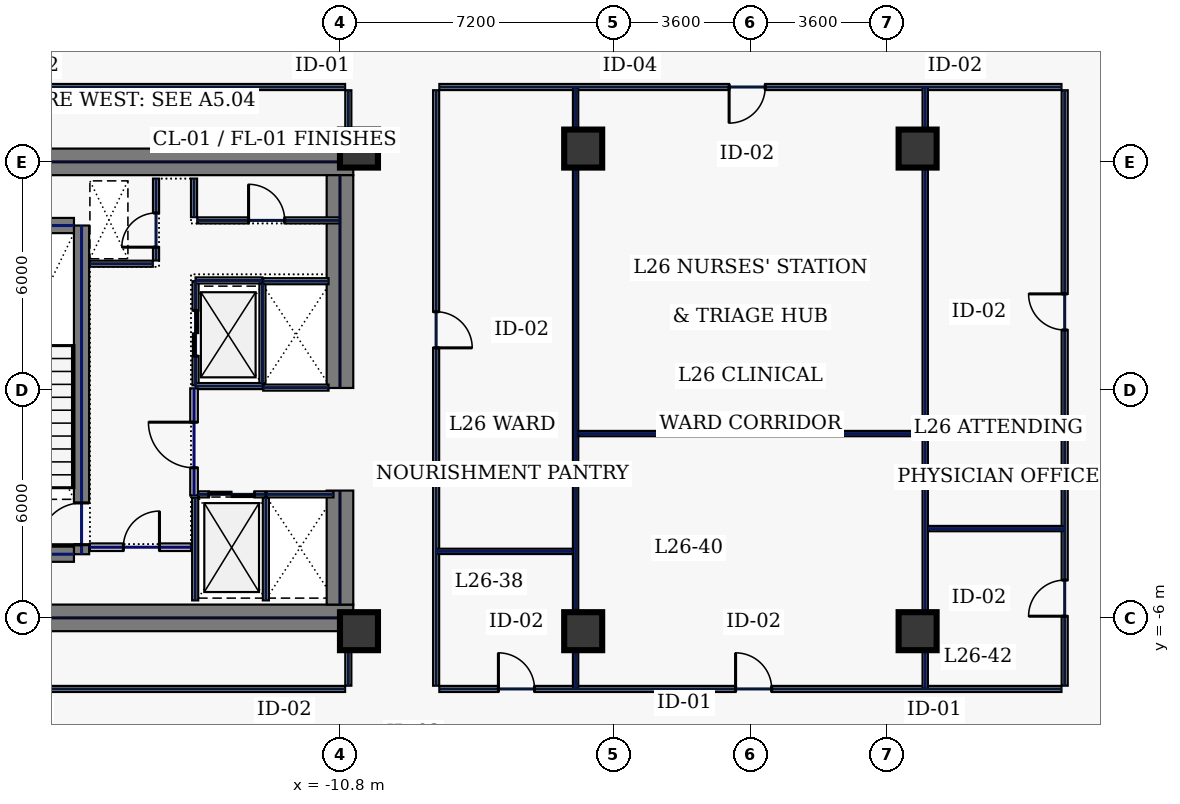
"""IFC4 building model, lengths in metres.
Left out: names, types, materials, properties, quantities, classifications, styles, units other than length and angle.
Written with IfcOpenShell. Run it as: python <this file> out.ifc"""

import sys

from ifc_helpers import new_model, si_unit, direction, frame, frame_2d, origin, origin_2d, place, context, subcontext, project, spatial, rectangle, hollow_rectangle, extrude, element, fill, save


model = new_model("IFC4")
c1 = context("Model", 3, precision=1e-05, world=origin(), true_north=direction((0.0, 1.0)))
c2 = subcontext(c1, "Body", "Model", "MODEL_VIEW")
j1 = project(units=[si_unit("LENGTHUNIT", "METRE"), si_unit("PLANEANGLEUNIT", "RADIAN")], contexts=[c1])
p1 = place(None, origin())
s1 = spatial("IfcSite", under=j1, at=p1, CompositionType="ELEMENT")
p2 = place(p1, origin())
s2 = spatial("IfcBuilding", under=s1, at=p2, CompositionType="ELEMENT")
p3 = place(p2, frame((0.0, 0.0, 117.4)))
s3 = spatial("IfcBuildingStorey", under=s2, at=p3, CompositionType="ELEMENT", Elevation=117.4)
for number, where, z_axis, x_axis in (
    (1, (-22.0, 6.0, 0.0), (0.0, 0.0, 1.0), (1.0, 0.0, 0.0)),
    (2, (-22.0, -6.0, 0.0), (0.0, 0.0, 1.0), (1.0, 0.0, 0.0)),
):
    element("IfcWall", number, at=place(p3, frame(where, z_axis=z_axis, x_axis=x_axis)), inside=s3, PredefinedType="SHEAR", context=c2, shape_type="SweptSolid", body=[
        extrude(rectangle(XDim=11.55, YDim=0.7, at=frame_2d((5.775, 0.0))), origin(), (0.0, 0.0, 1.0), 3.74),
    ])
p4 = place(p3, frame((-10.8, -5.65, 0.0), z_axis=(0.0, 0.0, 1.0), x_axis=(0.0, 1.0, 0.0)))
e3 = element("IfcWall", 3, at=p4, inside=s3, PredefinedType="SHEAR", context=c2, shape_type="SweptSolid", body=[
    extrude(rectangle(XDim=3.0, YDim=0.7, at=frame_2d((1.5, 0.0))), origin(), (0.0, 0.0, 1.0), 3.74),
])
p5 = place(p3, frame((-10.8, 0.05, 0.0), z_axis=(0.0, 0.0, 1.0), x_axis=(0.0, 1.0, 0.0)))
e4 = element("IfcWall", 4, at=p5, inside=s3, PredefinedType="SHEAR", context=c2, shape_type="SweptSolid", body=[
    extrude(rectangle(XDim=5.6, YDim=0.7, at=frame_2d((2.8, 0.0))), origin(), (0.0, 0.0, 1.0), 3.74),
])
p6 = place(p3, frame((-17.6, -4.325, 0.0), z_axis=(0.0, 0.0, 1.0), x_axis=(0.0, 1.0, 0.0)))
e5 = element("IfcWall", 5, at=p6, inside=s3, PredefinedType="SHEAR", context=c2, shape_type="SweptSolid", body=[
    extrude(rectangle(XDim=8.65, YDim=0.4, at=frame_2d((4.325, 0.0))), origin(), (0.0, 0.0, 1.0), 3.74),
])
p7 = place(p6, frame((0.25, 0.0, 0.0)))
e6 = element("IfcOpeningElement", 6, at=p7, cuts=e5, PredefinedType="OPENING", context=c2, shape_type="SweptSolid", body=[
    extrude(rectangle(XDim=1.1, YDim=2.2, at=frame_2d((0.55, 1.1))), frame((0.0, 0.21, 0.0), z_axis=(0.0, -1.0, 0.0), x_axis=(1.0, 0.0, 0.0)), (0.0, 0.0, 1.0), 0.42),
])
for number, where, z_axis, x_axis in (
    (7, (-21.2, -4.325, 0.0), (0.0, 0.0, 1.0), (1.0, 0.0, 0.0)),
    (8, (-21.2, 4.325, 0.0), (0.0, 0.0, 1.0), (1.0, 0.0, 0.0)),
):
    element("IfcWall", number, at=place(p3, frame(where, z_axis=z_axis, x_axis=x_axis)), inside=s3, PredefinedType="SHEAR", context=c2, shape_type="SweptSolid", body=[
        extrude(rectangle(XDim=3.4, YDim=0.4, at=frame_2d((1.7, 0.0))), origin(), (0.0, 0.0, 1.0), 3.74),
    ])
for number, where, z_axis, x_axis in (
    (9, (-10.3, -6.35, 0.0), (0.0, 0.0, 1.0), (1.0, 0.0, 0.0)),
    (10, (-10.3, 6.35, 0.0), (0.0, 0.0, 1.0), (1.0, 0.0, 0.0)),
    (11, (-4.4, -6.35, 0.0), (0.0, 0.0, 1.0), (1.0, 0.0, 0.0)),
    (12, (4.4, -6.35, 0.0), (0.0, 0.0, 1.0), (1.0, 0.0, 0.0)),
    (13, (-4.4, 6.35, 0.0), (0.0, 0.0, 1.0), (1.0, 0.0, 0.0)),
    (14, (4.4, 6.35, 0.0), (0.0, 0.0, 1.0), (1.0, 0.0, 0.0)),
):
    element("IfcColumn", number, at=place(p3, frame(where, z_axis=z_axis, x_axis=x_axis)), inside=s3, PredefinedType="COLUMN", context=c2, shape_type="SweptSolid", body=[
        extrude(hollow_rectangle(XDim=1.0, YDim=1.0, WallThickness=0.045, at=origin_2d()), origin(), (0.0, 0.0, 1.0), 3.74),
    ])
p8 = place(p3, frame((-14.6, 0.12, 0.0), z_axis=(0.0, 0.0, 1.0), x_axis=(0.0, 1.0, 0.0)))
e15 = element("IfcWall", 15, at=p8, inside=s3, PredefinedType="PARTITIONING", context=c2, shape_type="SweptSolid", body=[
    extrude(rectangle(XDim=2.74, YDim=0.16, at=frame_2d((1.37, 0.0))), origin(), (0.0, 0.0, 1.0), 3.74),
])
p9 = place(p8, frame((0.77, 0.0, 0.0)))
e16 = element("IfcOpeningElement", 16, at=p9, cuts=e15, PredefinedType="OPENING", context=c2, shape_type="SweptSolid", body=[
    extrude(rectangle(XDim=1.2, YDim=2.2, at=frame_2d((0.6, 1.1))), frame((0.0, 0.09, 0.0), z_axis=(0.0, -1.0, 0.0), x_axis=(1.0, 0.0, 0.0)), (0.0, 0.0, 1.0), 0.18),
])
for number, where, z_axis, x_axis in (
    (17, (-14.6, 0.1, 0.0), (0.0, 0.0, 1.0), (1.0, 0.0, 0.0)),
    (18, (-14.6, 2.88, 0.0), (0.0, 0.0, 1.0), (1.0, 0.0, 0.0)),
):
    element("IfcWall", number, at=place(p3, frame(where, z_axis=z_axis, x_axis=x_axis)), inside=s3, PredefinedType="PARTITIONING", context=c2, shape_type="SweptSolid", body=[
        extrude(rectangle(XDim=1.76, YDim=0.16, at=frame_2d((0.88, 0.0))), origin(), (0.0, 0.0, 1.0), 3.74),
    ])
p10 = place(p3, frame((-12.84, 0.18, 0.0), z_axis=(0.0, 0.0, 1.0), x_axis=(0.0, 1.0, 0.0)))
e19 = element("IfcWall", 19, at=p10, inside=s3, PredefinedType="PARTITIONING", context=c2, shape_type="SweptSolid", body=[
    extrude(rectangle(XDim=2.62, YDim=0.16, at=frame_2d((1.31, 0.0))), origin(), (0.0, 0.0, 1.0), 3.74),
])
p11 = place(p3, frame((-14.53, -2.75, 0.0), z_axis=(0.0, 0.0, 1.0), x_axis=(1.0, 0.0, 0.0)))
e20 = element("IfcWall", 20, at=p11, inside=s3, PredefinedType="PARTITIONING", context=c2, shape_type="SweptSolid", body=[
    extrude(rectangle(XDim=1.76, YDim=0.16, at=frame_2d((0.88, 0.0))), origin(), (0.0, 0.0, 1.0), 3.74),
])
p12 = place(p11, frame((0.28, 0.0, 0.0)))
e21 = element("IfcOpeningElement", 21, at=p12, cuts=e20, PredefinedType="OPENING", context=c2, shape_type="SweptSolid", body=[
    extrude(rectangle(XDim=1.2, YDim=2.2, at=frame_2d((0.6, 1.1))), frame((0.0, 0.09, 0.0), z_axis=(0.0, -1.0, 0.0), x_axis=(1.0, 0.0, 0.0)), (0.0, 0.0, 1.0), 0.18),
])
for number, where, z_axis, x_axis in (
    (22, (-12.75, -5.54, 0.0), (0.0, 0.0, 1.0), (0.0, 1.0, 0.0)),
    (23, (-14.61, -5.54, 0.0), (0.0, 0.0, 1.0), (0.0, 1.0, 0.0)),
):
    element("IfcWall", number, at=place(p3, frame(where, z_axis=z_axis, x_axis=x_axis)), inside=s3, PredefinedType="PARTITIONING", context=c2, shape_type="SweptSolid", body=[
        extrude(rectangle(XDim=2.7, YDim=0.16, at=frame_2d((1.35, 0.0))), origin(), (0.0, 0.0, 1.0), 3.74),
    ])
p13 = place(p3, frame((-12.73, -2.75, 0.0), z_axis=(0.0, 0.0, 1.0), x_axis=(1.0, 0.0, 0.0)))
e24 = element("IfcWall", 24, at=p13, inside=s3, PredefinedType="PARTITIONING", context=c2, shape_type="SweptSolid", body=[
    extrude(rectangle(XDim=1.76, YDim=0.16, at=frame_2d((0.88, 0.0))), origin(), (0.0, 0.0, 1.0), 3.74),
])
for number, where, z_axis, x_axis in (
    (25, (-12.82, 0.06, 0.0), (0.0, 0.0, 1.0), (1.0, 0.0, 0.0)),
    (26, (-12.82, 2.86, 0.0), (0.0, 0.0, 1.0), (1.0, 0.0, 0.0)),
):
    element("IfcWall", number, at=place(p3, frame(where, z_axis=z_axis, x_axis=x_axis)), inside=s3, PredefinedType="PARTITIONING", context=c2, shape_type="SweptSolid", body=[
        extrude(rectangle(XDim=1.72, YDim=0.16, at=frame_2d((0.86, 0.0))), origin(), (0.0, 0.0, 1.0), 3.74),
    ])
p14 = place(p3, frame((-15.64, 3.405, 0.0), z_axis=(0.0, 0.0, 1.0), x_axis=(0.0, 1.0, 0.0)))
e27 = element("IfcWall", 27, at=p14, inside=s3, PredefinedType="PARTITIONING", context=c2, shape_type="SweptSolid", body=[
    extrude(rectangle(XDim=2.155, YDim=0.16, at=frame_2d((1.078, 0.0))), origin(), (0.0, 0.0, 1.0), 3.74),
])
p15 = place(p14, frame((0.35, 0.0, 0.0)))
e28 = element("IfcOpeningElement", 28, at=p15, cuts=e27, PredefinedType="OPENING", context=c2, shape_type="SweptSolid", body=[
    extrude(rectangle(XDim=0.9, YDim=2.2, at=frame_2d((0.45, 1.1))), frame((0.0, 0.09, 0.0), z_axis=(0.0, -1.0, 0.0), x_axis=(1.0, 0.0, 0.0)), (0.0, 0.0, 1.0), 0.18),
])
p16 = place(p3, frame((-17.38, 3.32, 0.0), z_axis=(0.0, 0.0, 1.0), x_axis=(1.0, 0.0, 0.0)))
e29 = element("IfcWall", 29, at=p16, inside=s3, PredefinedType="PARTITIONING", context=c2, shape_type="SweptSolid", body=[
    extrude(rectangle(XDim=1.655, YDim=0.16, at=frame_2d((0.827, 0.0))), origin(), (0.0, 0.0, 1.0), 3.74),
])
p17 = place(p3, frame((-17.38, -4.14, 0.0), z_axis=(0.0, 0.0, 1.0), x_axis=(1.0, 0.0, 0.0)))
e30 = element("IfcWall", 30, at=p17, inside=s3, PredefinedType="SOLIDWALL", context=c2, shape_type="SweptSolid", body=[
    extrude(rectangle(XDim=2.66, YDim=0.2, at=frame_2d((1.33, 0.0))), origin(), (0.0, 0.0, 1.0), 3.74),
])
p18 = place(p17, frame((0.88, 0.0, 0.0)))
e31 = element("IfcOpeningElement", 31, at=p18, cuts=e30, PredefinedType="OPENING", context=c2, shape_type="SweptSolid", body=[
    extrude(rectangle(XDim=0.95, YDim=2.2, at=frame_2d((0.475, 1.1))), frame((0.0, 0.11, 0.0), z_axis=(0.0, -1.0, 0.0), x_axis=(1.0, 0.0, 0.0)), (0.0, 0.0, 1.0), 0.22),
])
p19 = place(p3, frame((-14.555, 4.46, 0.0), z_axis=(0.0, 0.0, 1.0), x_axis=(1.0, 0.0, 0.0)))
e32 = element("IfcWall", 32, at=p19, inside=s3, PredefinedType="PARTITIONING", context=c2, shape_type="SweptSolid", body=[
    extrude(rectangle(XDim=3.755, YDim=0.16, at=frame_2d((1.877, 0.0))), origin(), (0.0, 0.0, 1.0), 3.74),
])
p20 = place(p19, frame((1.35, 0.0, 0.0)))
e33 = element("IfcOpeningElement", 33, at=p20, cuts=e32, PredefinedType="OPENING", context=c2, shape_type="SweptSolid", body=[
    extrude(rectangle(XDim=0.95, YDim=2.2, at=frame_2d((0.475, 1.1))), frame((0.0, 0.09, 0.0), z_axis=(0.0, -1.0, 0.0), x_axis=(1.0, 0.0, 0.0)), (0.0, 0.0, 1.0), 0.18),
])
p21 = place(p3, frame((-14.64, 4.545, 0.0), z_axis=(0.0, 0.0, 1.0), x_axis=(0.0, 1.0, 0.0)))
e34 = element("IfcWall", 34, at=p21, inside=s3, PredefinedType="PARTITIONING", context=c2, shape_type="SweptSolid", body=[
    extrude(rectangle(XDim=1.015, YDim=0.16, at=frame_2d((0.508, 0.0))), origin(), (0.0, 0.0, 1.0), 3.74),
])
p22 = place(p3, frame((-14.64, -2.78, 0.0), z_axis=(0.0, 0.0, 1.0), x_axis=(0.0, 1.0, 0.0)))
e35 = element("IfcWall", 35, at=p22, inside=s3, PredefinedType="SOLIDWALL", context=c2, shape_type="SweptSolid", body=[
    extrude(rectangle(XDim=2.82, YDim=0.2, at=frame_2d((1.41, 0.0))), origin(), (0.0, 0.0, 1.0), 3.74),
])
p23 = place(p22, frame((0.73, 0.0, 0.0)))
e36 = element("IfcOpeningElement", 36, at=p23, cuts=e35, PredefinedType="OPENING", context=c2, shape_type="SweptSolid", body=[
    extrude(rectangle(XDim=1.2, YDim=2.2, at=frame_2d((0.6, 1.1))), frame((0.0, 0.11, 0.0), z_axis=(0.0, -1.0, 0.0), x_axis=(1.0, 0.0, 0.0)), (0.0, 0.0, 1.0), 0.22),
])
p24 = place(p3, frame((8.27, -7.785, 0.0), z_axis=(0.0, 0.0, 1.0), x_axis=(0.0, 1.0, 0.0)))
e37 = element("IfcWall", 37, at=p24, inside=s3, PredefinedType="PARTITIONING", context=c2, shape_type="SweptSolid", body=[
    extrude(rectangle(XDim=15.67, YDim=0.16, at=frame_2d((7.835, 0.0))), origin(), (0.0, 0.0, 1.0), 3.74),
])
p25 = place(p24, frame((1.829, 0.0, 0.0)))
e38 = element("IfcOpeningElement", 38, at=p25, cuts=e37, PredefinedType="OPENING", context=c2, shape_type="SweptSolid", body=[
    extrude(rectangle(XDim=0.95, YDim=2.2, at=frame_2d((0.475, 1.1))), frame((0.0, 0.09, 0.0), z_axis=(0.0, -1.0, 0.0), x_axis=(1.0, 0.0, 0.0)), (0.0, 0.0, 1.0), 0.18),
])
p26 = place(p24, frame((9.361, 0.0, 0.0)))
e39 = element("IfcOpeningElement", 39, at=p26, cuts=e37, PredefinedType="OPENING", context=c2, shape_type="SweptSolid", body=[
    extrude(rectangle(XDim=0.95, YDim=2.2, at=frame_2d((0.475, 1.1))), frame((0.0, 0.09, 0.0), z_axis=(0.0, -1.0, 0.0), x_axis=(1.0, 0.0, 0.0)), (0.0, 0.0, 1.0), 0.18),
])
p27 = place(p3, frame((8.185, 7.97, 0.0), z_axis=(0.0, 0.0, 1.0), x_axis=(-1.0, 0.0, 0.0)))
e40 = element("IfcWall", 40, at=p27, inside=s3, PredefinedType="PARTITIONING", context=c2, shape_type="SweptSolid", body=[
    extrude(rectangle(XDim=16.37, YDim=0.16, at=frame_2d((8.185, 0.0))), origin(), (0.0, 0.0, 1.0), 3.74),
])
p28 = place(p27, frame((7.795, 0.0, 0.0)))
e41 = element("IfcOpeningElement", 41, at=p28, cuts=e40, PredefinedType="OPENING", context=c2, shape_type="SweptSolid", body=[
    extrude(rectangle(XDim=0.95, YDim=2.2, at=frame_2d((0.475, 1.1))), frame((0.0, 0.09, 0.0), z_axis=(0.0, -1.0, 0.0), x_axis=(1.0, 0.0, 0.0)), (0.0, 0.0, 1.0), 0.18),
])
p29 = place(p3, frame((-8.27, 7.885, 0.0), z_axis=(0.0, 0.0, 1.0), x_axis=(0.0, -1.0, 0.0)))
e42 = element("IfcWall", 42, at=p29, inside=s3, PredefinedType="PARTITIONING", context=c2, shape_type="SweptSolid", body=[
    extrude(rectangle(XDim=15.67, YDim=0.16, at=frame_2d((7.835, 0.0))), origin(), (0.0, 0.0, 1.0), 3.74),
])
p30 = place(p29, frame((5.829, 0.0, 0.0)))
e43 = element("IfcOpeningElement", 43, at=p30, cuts=e42, PredefinedType="OPENING", context=c2, shape_type="SweptSolid", body=[
    extrude(rectangle(XDim=0.95, YDim=2.2, at=frame_2d((0.475, 1.1))), frame((0.0, 0.09, 0.0), z_axis=(0.0, -1.0, 0.0), x_axis=(1.0, 0.0, 0.0)), (0.0, 0.0, 1.0), 0.18),
])
p31 = place(p3, frame((-8.185, -7.87, 0.0), z_axis=(0.0, 0.0, 1.0), x_axis=(1.0, 0.0, 0.0)))
e44 = element("IfcWall", 44, at=p31, inside=s3, PredefinedType="PARTITIONING", context=c2, shape_type="SweptSolid", body=[
    extrude(rectangle(XDim=16.37, YDim=0.16, at=frame_2d((8.185, 0.0))), origin(), (0.0, 0.0, 1.0), 3.74),
])
p32 = place(p31, frame((1.554, 0.0, 0.0)))
e45 = element("IfcOpeningElement", 45, at=p32, cuts=e44, PredefinedType="OPENING", context=c2, shape_type="SweptSolid", body=[
    extrude(rectangle(XDim=0.95, YDim=2.2, at=frame_2d((0.475, 1.1))), frame((0.0, 0.09, 0.0), z_axis=(0.0, -1.0, 0.0), x_axis=(1.0, 0.0, 0.0)), (0.0, 0.0, 1.0), 0.18),
])
p33 = place(p31, frame((7.795, 0.0, 0.0)))
e46 = element("IfcOpeningElement", 46, at=p33, cuts=e44, PredefinedType="OPENING", context=c2, shape_type="SweptSolid", body=[
    extrude(rectangle(XDim=0.95, YDim=2.2, at=frame_2d((0.475, 1.1))), frame((0.0, 0.09, 0.0), z_axis=(0.0, -1.0, 0.0), x_axis=(1.0, 0.0, 0.0)), (0.0, 0.0, 1.0), 0.18),
])
p34 = place(p3, frame((-10.58, -7.785, 0.0), z_axis=(0.0, 0.0, 1.0), x_axis=(0.0, 1.0, 0.0)))
e47 = element("IfcWall", 47, at=p34, inside=s3, PredefinedType="PARTITIONING", context=c2, shape_type="SweptSolid", body=[
    extrude(rectangle(XDim=1.365, YDim=0.16, at=frame_2d((0.683, 0.0))), origin(), (0.0, 0.0, 1.0), 3.74),
])
p35 = place(p3, frame((-10.58, 6.42, 0.0), z_axis=(0.0, 0.0, 1.0), x_axis=(0.0, 1.0, 0.0)))
e48 = element("IfcWall", 48, at=p35, inside=s3, PredefinedType="PARTITIONING", context=c2, shape_type="SweptSolid", body=[
    extrude(rectangle(XDim=1.465, YDim=0.16, at=frame_2d((0.732, 0.0))), origin(), (0.0, 0.0, 1.0), 3.74),
])
for number, where, z_axis, x_axis in (
    (49, (-10.665, 7.97, 0.0), (0.0, 0.0, 1.0), (-1.0, 0.0, 0.0)),
    (50, (-25.235, -7.87, 0.0), (0.0, 0.0, 1.0), (1.0, 0.0, 0.0)),
):
    element("IfcWall", number, at=place(p3, frame(where, z_axis=z_axis, x_axis=x_axis)), inside=s3, PredefinedType="PARTITIONING", context=c2, shape_type="SweptSolid", body=[
        extrude(rectangle(XDim=14.57, YDim=0.16, at=frame_2d((7.285, 0.0))), origin(), (0.0, 0.0, 1.0), 3.74),
    ])
for number, where, z_axis, x_axis in (
    (51, (-4.6, -7.865, 0.0), (0.0, 0.0, 1.0), (0.0, 1.0, 0.0)),
    (52, (4.6, -7.865, 0.0), (0.0, 0.0, 1.0), (0.0, 1.0, 0.0)),
):
    element("IfcWall", number, at=place(p3, frame(where, z_axis=z_axis, x_axis=x_axis)), inside=s3, PredefinedType="PARTITIONING", context=c2, shape_type="SweptSolid", body=[
        extrude(rectangle(XDim=15.83, YDim=0.14, at=frame_2d((7.915, 0.0))), origin(), (0.0, 0.0, 1.0), 2.935),
    ])
p36 = place(p3, frame((-4.525, -1.15, 0.0), z_axis=(0.0, 0.0, 1.0), x_axis=(1.0, 0.0, 0.0)))
e53 = element("IfcWall", 53, at=p36, inside=s3, PredefinedType="PARTITIONING", context=c2, shape_type="SweptSolid", body=[
    extrude(rectangle(XDim=9.05, YDim=0.14, at=frame_2d((4.525, 0.0))), origin(), (0.0, 0.0, 1.0), 3.74),
])
for number, where, z_axis, x_axis in (
    (54, (-8.265, -4.25, 0.0), (0.0, 0.0, 1.0), (1.0, 0.0, 0.0)),
    (55, (4.675, -3.65, 0.0), (0.0, 0.0, 1.0), (1.0, 0.0, 0.0)),
):
    element("IfcWall", number, at=place(p3, frame(where, z_axis=z_axis, x_axis=x_axis)), inside=s3, PredefinedType="PARTITIONING", context=c2, shape_type="SweptSolid", body=[
        extrude(rectangle(XDim=3.59, YDim=0.14, at=frame_2d((1.795, 0.0))), origin(), (0.0, 0.0, 1.0), 3.74),
    ])
p37 = place(p7, origin())
e56 = element("IfcDoor", 56, at=p37, inside=s3, OperationType="SINGLE_SWING_LEFT", PredefinedType="DOOR", context=c2, shape_type="SweptSolid", body=[
    extrude(rectangle(XDim=1.1, YDim=2.2, at=frame_2d((0.55, 1.1))), frame((0.0, 0.025, 0.0), z_axis=(0.0, -1.0, 0.0), x_axis=(1.0, 0.0, 0.0)), (0.0, 0.0, 1.0), 0.05),
])
fill(e6, e56)
p38 = place(p9, origin())
e57 = element("IfcDoor", 57, at=p38, inside=s3, OperationType="SLIDING_TO_LEFT", PredefinedType="DOOR", context=c2, shape_type="SweptSolid", body=[
    extrude(rectangle(XDim=1.2, YDim=2.2, at=frame_2d((0.6, 1.1))), frame((0.0, 0.025, 0.0), z_axis=(0.0, -1.0, 0.0), x_axis=(1.0, 0.0, 0.0)), (0.0, 0.0, 1.0), 0.05),
])
fill(e16, e57)
p39 = place(p12, origin())
e58 = element("IfcDoor", 58, at=p39, inside=s3, OperationType="SLIDING_TO_LEFT", PredefinedType="DOOR", context=c2, shape_type="SweptSolid", body=[
    extrude(rectangle(XDim=1.2, YDim=2.2, at=frame_2d((0.6, 1.1))), frame((0.0, 0.025, 0.0), z_axis=(0.0, -1.0, 0.0), x_axis=(1.0, 0.0, 0.0)), (0.0, 0.0, 1.0), 0.05),
])
fill(e21, e58)
p40 = place(p15, origin())
e59 = element("IfcDoor", 59, at=p40, inside=s3, OperationType="SINGLE_SWING_LEFT", PredefinedType="DOOR", context=c2, shape_type="SweptSolid", body=[
    extrude(rectangle(XDim=0.9, YDim=2.2, at=frame_2d((0.45, 1.1))), frame((0.0, 0.025, 0.0), z_axis=(0.0, -1.0, 0.0), x_axis=(1.0, 0.0, 0.0)), (0.0, 0.0, 1.0), 0.05),
])
fill(e28, e59)
p41 = place(p18, origin())
e60 = element("IfcDoor", 60, at=p41, inside=s3, OperationType="SINGLE_SWING_RIGHT", PredefinedType="DOOR", context=c2, shape_type="SweptSolid", body=[
    extrude(rectangle(XDim=0.95, YDim=2.2, at=frame_2d((0.475, 1.1))), frame((0.0, 0.025, 0.0), z_axis=(0.0, -1.0, 0.0), x_axis=(1.0, 0.0, 0.0)), (0.0, 0.0, 1.0), 0.05),
])
fill(e31, e60)
p42 = place(p20, origin())
e61 = element("IfcDoor", 61, at=p42, inside=s3, OperationType="SINGLE_SWING_LEFT", PredefinedType="DOOR", context=c2, shape_type="SweptSolid", body=[
    extrude(rectangle(XDim=0.95, YDim=2.2, at=frame_2d((0.475, 1.1))), frame((0.0, 0.025, 0.0), z_axis=(0.0, -1.0, 0.0), x_axis=(1.0, 0.0, 0.0)), (0.0, 0.0, 1.0), 0.05),
])
fill(e33, e61)
p43 = place(p23, origin())
e62 = element("IfcDoor", 62, at=p43, inside=s3, OperationType="SINGLE_SWING_RIGHT", PredefinedType="DOOR", context=c2, shape_type="SweptSolid", body=[
    extrude(rectangle(XDim=1.2, YDim=2.2, at=frame_2d((0.6, 1.1))), frame((0.0, 0.025, 0.0), z_axis=(0.0, -1.0, 0.0), x_axis=(1.0, 0.0, 0.0)), (0.0, 0.0, 1.0), 0.05),
])
fill(e36, e62)
p44 = place(p32, origin())
e63 = element("IfcDoor", 63, at=p44, inside=s3, OperationType="SINGLE_SWING_LEFT", PredefinedType="DOOR", context=c2, shape_type="SweptSolid", body=[
    extrude(rectangle(XDim=0.95, YDim=2.2, at=frame_2d((0.475, 1.1))), frame((0.0, 0.025, 0.0), z_axis=(0.0, -1.0, 0.0), x_axis=(1.0, 0.0, 0.0)), (0.0, 0.0, 1.0), 0.05),
])
fill(e45, e63)
p45 = place(p30, origin())
e64 = element("IfcDoor", 64, at=p45, inside=s3, OperationType="SINGLE_SWING_RIGHT", PredefinedType="DOOR", context=c2, shape_type="SweptSolid", body=[
    extrude(rectangle(XDim=0.95, YDim=2.2, at=frame_2d((0.475, 1.1))), frame((0.0, 0.025, 0.0), z_axis=(0.0, -1.0, 0.0), x_axis=(1.0, 0.0, 0.0)), (0.0, 0.0, 1.0), 0.05),
])
fill(e43, e64)
p46 = place(p33, origin())
e65 = element("IfcDoor", 65, at=p46, inside=s3, OperationType="SINGLE_SWING_LEFT", PredefinedType="DOOR", context=c2, shape_type="SweptSolid", body=[
    extrude(rectangle(XDim=0.95, YDim=2.2, at=frame_2d((0.475, 1.1))), frame((0.0, 0.025, 0.0), z_axis=(0.0, -1.0, 0.0), x_axis=(1.0, 0.0, 0.0)), (0.0, 0.0, 1.0), 0.05),
])
fill(e46, e65)
p47 = place(p28, origin())
e66 = element("IfcDoor", 66, at=p47, inside=s3, OperationType="SINGLE_SWING_RIGHT", PredefinedType="DOOR", context=c2, shape_type="SweptSolid", body=[
    extrude(rectangle(XDim=0.95, YDim=2.2, at=frame_2d((0.475, 1.1))), frame((0.0, 0.025, 0.0), z_axis=(0.0, -1.0, 0.0), x_axis=(1.0, 0.0, 0.0)), (0.0, 0.0, 1.0), 0.05),
])
fill(e41, e66)
p48 = place(p25, origin())
e67 = element("IfcDoor", 67, at=p48, inside=s3, OperationType="SINGLE_SWING_LEFT", PredefinedType="DOOR", context=c2, shape_type="SweptSolid", body=[
    extrude(rectangle(XDim=0.95, YDim=2.2, at=frame_2d((0.475, 1.1))), frame((0.0, 0.025, 0.0), z_axis=(0.0, -1.0, 0.0), x_axis=(1.0, 0.0, 0.0)), (0.0, 0.0, 1.0), 0.05),
])
fill(e38, e67)
p49 = place(p26, origin())
e68 = element("IfcDoor", 68, at=p49, inside=s3, OperationType="SINGLE_SWING_RIGHT", PredefinedType="DOOR", context=c2, shape_type="SweptSolid", body=[
    extrude(rectangle(XDim=0.95, YDim=2.2, at=frame_2d((0.475, 1.1))), frame((0.0, 0.025, 0.0), z_axis=(0.0, -1.0, 0.0), x_axis=(1.0, 0.0, 0.0)), (0.0, 0.0, 1.0), 0.05),
])
fill(e39, e68)
save(model, sys.argv[1])
